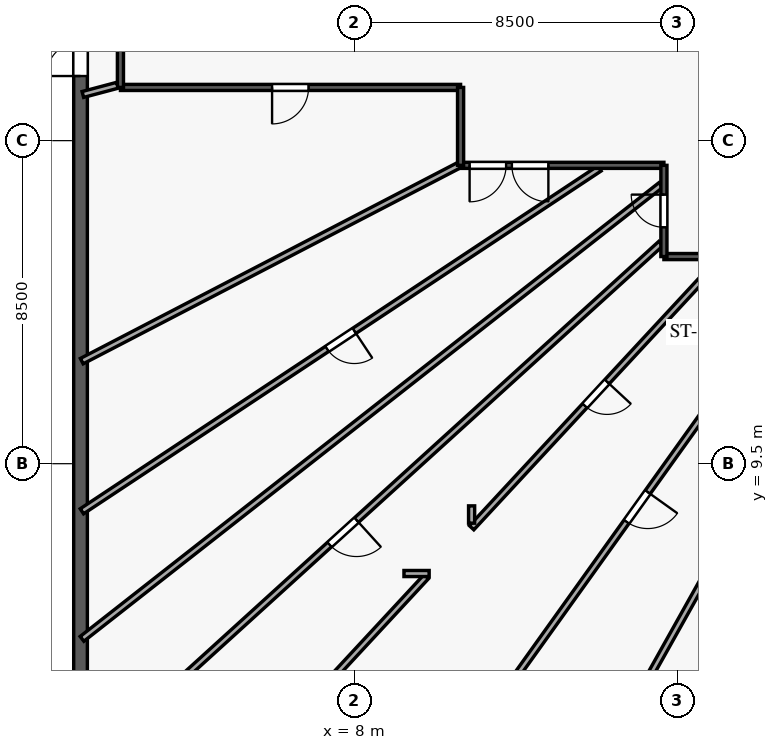
"""IFC4 building model, lengths in metres.
Left out: names, types, materials, properties, quantities, classifications, styles, units other than length and angle.
Written with IfcOpenShell. Run it as: python <this file> out.ifc"""

import sys

from ifc_helpers import new_model, si_unit, direction, frame, frame_2d, origin, origin_with_axes, origin_2d, place, context, subcontext, project, spatial, rectangle, circle, extrude, source, transform, mapped, element, fill, save


model = new_model("IFC4")
c1 = context("Model", 3, precision=1e-05, world=origin(), true_north=direction((0.0, 1.0)))
c2 = subcontext(c1, "Body", "Model", "MODEL_VIEW")
j1 = project(units=[si_unit("LENGTHUNIT", "METRE"), si_unit("PLANEANGLEUNIT", "RADIAN")], contexts=[c1])
p1 = place(None, origin())
s1 = spatial("IfcSite", under=j1, at=p1, CompositionType="ELEMENT")
p2 = place(p1, origin())
s2 = spatial("IfcBuilding", under=s1, at=p2, CompositionType="ELEMENT")
p3 = place(p2, origin())
s3 = spatial("IfcBuildingStorey", under=s2, at=p3, CompositionType="ELEMENT", Elevation=0.0)
m1 = source(origin_with_axes(), c2, "Body", "SweptSolid", [
    extrude(circle(Radius=0.9, at=origin_2d()), origin(), (0.0, 0.0, 1.0), 4.5),
])
p4 = place(p3, frame((10.2, 7.5, 0.0), z_axis=(0.0, 0.0, 1.0), x_axis=(1.0, 0.0, 0.0)))
e1 = element("IfcColumn", 1, at=p4, inside=s3, PredefinedType="COLUMN", context=c2, shape_type="MappedRepresentation", body=[
    mapped(m1, transform((0.0, 0.0, 0.0), scale=1.0)),
])
p5 = place(p3, frame((0.8, 2.5, 0.0), z_axis=(0.0, 0.0, 1.0), x_axis=(0.0, 1.0, 0.0)))
e2 = element("IfcWall", 2, at=p5, inside=s3, PredefinedType="SOLIDWALL", context=c2, shape_type="SweptSolid", body=[
    extrude(rectangle(XDim=48.0, YDim=0.36, at=frame_2d((24.0, 0.0))), origin(), (0.0, 0.0, 1.0), 4.2),
])
p6 = place(p5, frame((42.816, 0.0, 0.85)))
e3 = element("IfcOpeningElement", 3, at=p6, cuts=e2, PredefinedType="OPENING", context=c2, shape_type="SweptSolid", body=[
    extrude(rectangle(XDim=1.8, YDim=2.2, at=frame_2d((0.9, 1.1))), frame((0.0, 0.19, 0.0), z_axis=(0.0, -1.0, 0.0), x_axis=(1.0, 0.0, 0.0)), (0.0, 0.0, 1.0), 0.38),
])
p7 = place(p5, frame((38.338, 0.0, 0.85)))
e4 = element("IfcOpeningElement", 4, at=p7, cuts=e2, PredefinedType="OPENING", context=c2, shape_type="SweptSolid", body=[
    extrude(rectangle(XDim=1.8, YDim=2.2, at=frame_2d((0.9, 1.1))), frame((0.0, 0.19, 0.0), z_axis=(0.0, -1.0, 0.0), x_axis=(1.0, 0.0, 0.0)), (0.0, 0.0, 1.0), 0.38),
])
p8 = place(p5, frame((33.194, 0.0, 0.85)))
e5 = element("IfcOpeningElement", 5, at=p8, cuts=e2, PredefinedType="OPENING", context=c2, shape_type="SweptSolid", body=[
    extrude(rectangle(XDim=1.8, YDim=2.2, at=frame_2d((0.9, 1.1))), frame((0.0, 0.19, 0.0), z_axis=(0.0, -1.0, 0.0), x_axis=(1.0, 0.0, 0.0)), (0.0, 0.0, 1.0), 0.38),
])
p9 = place(p5, frame((29.492, 0.0, 0.85)))
e6 = element("IfcOpeningElement", 6, at=p9, cuts=e2, PredefinedType="OPENING", context=c2, shape_type="SweptSolid", body=[
    extrude(rectangle(XDim=1.8, YDim=2.2, at=frame_2d((0.9, 1.1))), frame((0.0, 0.19, 0.0), z_axis=(0.0, -1.0, 0.0), x_axis=(1.0, 0.0, 0.0)), (0.0, 0.0, 1.0), 0.38),
])
p10 = place(p5, frame((24.971, 0.0, 0.85)))
e7 = element("IfcOpeningElement", 7, at=p10, cuts=e2, PredefinedType="OPENING", context=c2, shape_type="SweptSolid", body=[
    extrude(rectangle(XDim=1.8, YDim=2.2, at=frame_2d((0.9, 1.1))), frame((0.0, 0.19, 0.0), z_axis=(0.0, -1.0, 0.0), x_axis=(1.0, 0.0, 0.0)), (0.0, 0.0, 1.0), 0.38),
])
p11 = place(p5, frame((12.315, 0.0, 0.85)))
e8 = element("IfcOpeningElement", 8, at=p11, cuts=e2, PredefinedType="OPENING", context=c2, shape_type="SweptSolid", body=[
    extrude(rectangle(XDim=1.8, YDim=2.2, at=frame_2d((0.9, 1.1))), frame((0.0, 0.19, 0.0), z_axis=(0.0, -1.0, 0.0), x_axis=(1.0, 0.0, 0.0)), (0.0, 0.0, 1.0), 0.38),
])
p12 = place(p5, frame((6.841, 0.0, 0.85)))
e9 = element("IfcOpeningElement", 9, at=p12, cuts=e2, PredefinedType="OPENING", context=c2, shape_type="SweptSolid", body=[
    extrude(rectangle(XDim=1.8, YDim=2.2, at=frame_2d((0.9, 1.1))), frame((0.0, 0.19, 0.0), z_axis=(0.0, -1.0, 0.0), x_axis=(1.0, 0.0, 0.0)), (0.0, 0.0, 1.0), 0.38),
])
p13 = place(p5, frame((3.189, 0.0, 0.85)))
e10 = element("IfcOpeningElement", 10, at=p13, cuts=e2, PredefinedType="OPENING", context=c2, shape_type="SweptSolid", body=[
    extrude(rectangle(XDim=1.8, YDim=2.2, at=frame_2d((0.9, 1.1))), frame((0.0, 0.19, 0.0), z_axis=(0.0, -1.0, 0.0), x_axis=(1.0, 0.0, 0.0)), (0.0, 0.0, 1.0), 0.38),
])
p14 = place(p5, frame((17.2, 0.0, 0.0)))
e11 = element("IfcOpeningElement", 11, at=p14, cuts=e2, PredefinedType="OPENING", context=c2, shape_type="SweptSolid", body=[
    extrude(rectangle(XDim=1.8, YDim=2.3, at=frame_2d((0.9, 1.15))), frame((0.0, 0.19, 0.0), z_axis=(0.0, -1.0, 0.0), x_axis=(1.0, 0.0, 0.0)), (0.0, 0.0, 1.0), 0.38),
])
p15 = place(p3, frame((16.068, 15.289, 0.0), z_axis=(0.0, 0.0, 1.0), x_axis=(-0.740229029454, -0.672354805109, 0.0)))
e12 = element("IfcWall", 12, at=p15, inside=s3, PredefinedType="PARTITIONING", context=c2, shape_type="SweptSolid", body=[
    extrude(rectangle(XDim=19.837, YDim=0.16, at=frame_2d((9.918, 0.0))), origin(), (0.0, 0.0, 1.0), 3.25),
])
p16 = place(p15, frame((10.816, 0.0, 0.0)))
e13 = element("IfcOpeningElement", 13, at=p16, cuts=e12, PredefinedType="OPENING", context=c2, shape_type="SweptSolid", body=[
    extrude(rectangle(XDim=0.96, YDim=2.15, at=frame_2d((0.48, 1.075))), frame((0.0, 0.09, 0.0), z_axis=(0.0, -1.0, 0.0), x_axis=(1.0, 0.0, 0.0)), (0.0, 0.0, 1.0), 0.18),
])
p17 = place(p3, frame((16.068, 16.83, 0.0), z_axis=(0.0, 0.0, 1.0), x_axis=(-0.786986378296, -0.616970372366, 0.0)))
e14 = element("IfcWall", 14, at=p17, inside=s3, PredefinedType="PARTITIONING", context=c2, shape_type="SweptSolid", body=[
    extrude(rectangle(XDim=19.351, YDim=0.16, at=frame_2d((9.676, 0.0))), origin(), (0.0, 0.0, 1.0), 4.2),
])
p18 = place(p3, frame((14.454, 17.268, 0.0), z_axis=(0.0, 0.0, 1.0), x_axis=(-0.83369067589, -0.55223170584, 0.0)))
e15 = element("IfcWall", 15, at=p18, inside=s3, PredefinedType="PARTITIONING", context=c2, shape_type="SweptSolid", body=[
    extrude(rectangle(XDim=16.335, YDim=0.16, at=frame_2d((8.167, 0.0))), origin(), (0.0, 0.0, 1.0), 4.2),
])
p19 = place(p18, frame((7.737, 0.0, 0.0)))
e16 = element("IfcOpeningElement", 16, at=p19, cuts=e15, PredefinedType="OPENING", context=c2, shape_type="SweptSolid", body=[
    extrude(rectangle(XDim=0.86, YDim=2.04, at=frame_2d((0.43, 1.02))), frame((0.0, 0.09, 0.0), z_axis=(0.0, -1.0, 0.0), x_axis=(1.0, 0.0, 0.0)), (0.0, 0.0, 1.0), 0.18),
])
p20 = place(p3, frame((20.101, 14.868, 0.0), z_axis=(0.0, 0.0, 1.0), x_axis=(-0.581991703878, -0.813194722448, 0.0)))
e17 = element("IfcWall", 17, at=p20, inside=s3, PredefinedType="PARTITIONING", context=c2, shape_type="SweptSolid", body=[
    extrude(rectangle(XDim=16.024, YDim=0.16, at=frame_2d((8.012, 0.0))), origin(), (0.0, 0.0, 1.0), 4.2),
])
p21 = place(p20, frame((7.52, 0.0, 0.0)))
e18 = element("IfcOpeningElement", 18, at=p21, cuts=e17, PredefinedType="OPENING", context=c2, shape_type="SweptSolid", body=[
    extrude(rectangle(XDim=0.96, YDim=2.15, at=frame_2d((0.48, 1.075))), frame((0.0, 0.09, 0.0), z_axis=(0.0, -1.0, 0.0), x_axis=(1.0, 0.0, 0.0)), (0.0, 0.0, 1.0), 0.18),
])
p22 = place(p3, frame((21.118, 13.45, 0.0), z_axis=(0.0, 0.0, 1.0), x_axis=(-0.488869643444, -0.872356848841, 0.0)))
e19 = element("IfcWall", 19, at=p22, inside=s3, PredefinedType="PARTITIONING", context=c2, shape_type="SweptSolid", body=[
    extrude(rectangle(XDim=13.316, YDim=0.16, at=frame_2d((6.658, 0.0))), origin(), (0.0, 0.0, 1.0), 4.2),
])
p23 = place(p3, frame((10.827, 17.389, 0.0), z_axis=(0.0, 0.0, 1.0), x_axis=(-0.8874495265, -0.460904912009, 0.0)))
e20 = element("IfcWall", 20, at=p23, inside=s3, PredefinedType="PARTITIONING", context=c2, shape_type="SweptSolid", body=[
    extrude(rectangle(XDim=11.262, YDim=0.16, at=frame_2d((5.631, 0.0))), origin(), (0.0, 0.0, 1.0), 4.2),
])
p24 = place(p3, frame((17.631, 14.868, 0.0), z_axis=(0.0, 0.0, 1.0), x_axis=(-0.679969088338, -0.733240778261, 0.0)))
e21 = element("IfcWall", 21, at=p24, inside=s3, PredefinedType="PARTITIONING", context=c2, shape_type="SweptSolid", body=[
    extrude(rectangle(XDim=9.62, YDim=0.16, at=frame_2d((4.81, 0.0))), origin(), (0.0, 0.0, 1.0), 3.25),
])
p25 = place(p24, frame((4.38, 0.0, 0.0)))
e22 = element("IfcOpeningElement", 22, at=p25, cuts=e21, PredefinedType="OPENING", context=c2, shape_type="SweptSolid", body=[
    extrude(rectangle(XDim=0.86, YDim=2.04, at=frame_2d((0.43, 1.02))), frame((0.0, 0.09, 0.0), z_axis=(0.0, -1.0, 0.0), x_axis=(1.0, 0.0, 0.0)), (0.0, 0.0, 1.0), 0.18),
])
p26 = place(p3, frame((10.8, 19.4, 0.0), z_axis=(0.0, 0.0, 1.0), x_axis=(-1.0, 0.0, 0.0)))
e23 = element("IfcWall", 23, at=p26, inside=s3, PredefinedType="PARTITIONING", context=c2, shape_type="SweptSolid", body=[
    extrude(rectangle(XDim=8.95, YDim=0.16, at=frame_2d((4.475, 0.0))), origin(), (0.0, 0.0, 1.0), 4.2),
])
p27 = place(p26, frame((4.0, 0.0, 0.0)))
e24 = element("IfcOpeningElement", 24, at=p27, cuts=e23, PredefinedType="OPENING", context=c2, shape_type="SweptSolid", body=[
    extrude(rectangle(XDim=0.96, YDim=2.15, at=frame_2d((0.48, 1.075))), frame((0.0, 0.09, 0.0), z_axis=(0.0, -1.0, 0.0), x_axis=(1.0, 0.0, 0.0)), (0.0, 0.0, 1.0), 0.18),
])
p28 = place(p3, frame((9.897, 6.528, 0.0), z_axis=(0.0, 0.0, 1.0), x_axis=(-0.679977657187, -0.733232831866, 0.0)))
e25 = element("IfcWall", 25, at=p28, inside=s3, PredefinedType="PARTITIONING", context=c2, shape_type="SweptSolid", body=[
    extrude(rectangle(XDim=6.391, YDim=0.16, at=frame_2d((3.195, 0.0))), origin(), (0.0, 0.0, 1.0), 4.2),
])
p29 = place(p3, frame((16.15, 17.35, 0.0), z_axis=(0.0, 0.0, 1.0), x_axis=(-1.0, 0.0, 0.0)))
e26 = element("IfcWall", 26, at=p29, inside=s3, PredefinedType="PARTITIONING", context=c2, shape_type="SweptSolid", body=[
    extrude(rectangle(XDim=5.35, YDim=0.16, at=frame_2d((2.675, 0.0))), origin(), (0.0, 0.0, 1.0), 4.2),
])
p30 = place(p29, frame((3.04, 0.0, 0.0)))
e27 = element("IfcOpeningElement", 27, at=p30, cuts=e26, PredefinedType="OPENING", context=c2, shape_type="SweptSolid", body=[
    extrude(rectangle(XDim=0.96, YDim=2.15, at=frame_2d((0.48, 1.075))), frame((0.0, 0.09, 0.0), z_axis=(0.0, -1.0, 0.0), x_axis=(1.0, 0.0, 0.0)), (0.0, 0.0, 1.0), 0.18),
])
p31 = place(p29, frame((4.153, 0.0, 0.0)))
e28 = element("IfcOpeningElement", 28, at=p31, cuts=e26, PredefinedType="OPENING", context=c2, shape_type="SweptSolid", body=[
    extrude(rectangle(XDim=0.96, YDim=2.15, at=frame_2d((0.48, 1.075))), frame((0.0, 0.09, 0.0), z_axis=(0.0, -1.0, 0.0), x_axis=(1.0, 0.0, 0.0)), (0.0, 0.0, 1.0), 0.18),
])
p32 = place(p3, frame((21.2, 14.95, 0.0), z_axis=(0.0, 0.0, 1.0), x_axis=(-1.0, 0.0, 0.0)))
e29 = element("IfcWall", 29, at=p32, inside=s3, PredefinedType="PARTITIONING", context=c2, shape_type="SweptSolid", body=[
    extrude(rectangle(XDim=5.05, YDim=0.16, at=frame_2d((2.525, 0.0))), origin(), (0.0, 0.0, 1.0), 4.2),
])
p33 = place(p32, frame((2.05, 0.0, 0.0)))
e30 = element("IfcOpeningElement", 30, at=p33, cuts=e29, PredefinedType="OPENING", context=c2, shape_type="SweptSolid", body=[
    extrude(rectangle(XDim=0.96, YDim=2.15, at=frame_2d((0.48, 1.075))), frame((0.0, 0.09, 0.0), z_axis=(0.0, -1.0, 0.0), x_axis=(1.0, 0.0, 0.0)), (0.0, 0.0, 1.0), 0.18),
])
p34 = place(p3, frame((1.85, 19.4, 0.0), z_axis=(0.0, 0.0, 1.0), x_axis=(0.0, 1.0, 0.0)))
e31 = element("IfcWall", 31, at=p34, inside=s3, PredefinedType="PARTITIONING", context=c2, shape_type="SweptSolid", body=[
    extrude(rectangle(XDim=2.45, YDim=0.16, at=frame_2d((1.225, 0.0))), origin(), (0.0, 0.0, 1.0), 4.2),
])
p35 = place(p3, frame((16.15, 14.95, 0.0), z_axis=(0.0, 0.0, 1.0), x_axis=(0.0, 1.0, 0.0)))
e32 = element("IfcWall", 32, at=p35, inside=s3, PredefinedType="PARTITIONING", context=c2, shape_type="SweptSolid", body=[
    extrude(rectangle(XDim=2.4, YDim=0.16, at=frame_2d((1.2, 0.0))), origin(), (0.0, 0.0, 1.0), 3.25),
])
p36 = place(p35, frame((0.77, 0.0, 0.0)))
e33 = element("IfcOpeningElement", 33, at=p36, cuts=e32, PredefinedType="OPENING", context=c2, shape_type="SweptSolid", body=[
    extrude(rectangle(XDim=0.86, YDim=2.04, at=frame_2d((0.43, 1.02))), frame((0.0, 0.09, 0.0), z_axis=(0.0, -1.0, 0.0), x_axis=(1.0, 0.0, 0.0)), (0.0, 0.0, 1.0), 0.18),
])
p37 = place(p3, frame((10.8, 17.35, 0.0), z_axis=(0.0, 0.0, 1.0), x_axis=(0.0, 1.0, 0.0)))
e34 = element("IfcWall", 34, at=p37, inside=s3, PredefinedType="PARTITIONING", context=c2, shape_type="SweptSolid", body=[
    extrude(rectangle(XDim=2.05, YDim=0.16, at=frame_2d((1.025, 0.0))), origin(), (0.0, 0.0, 1.0), 3.25),
])
p38 = place(p3, frame((1.768, 19.456, 0.0), z_axis=(0.0, 0.0, 1.0), x_axis=(-0.966407427341, -0.257014949721, 0.0)))
e35 = element("IfcWall", 35, at=p38, inside=s3, PredefinedType="PARTITIONING", context=c2, shape_type="SweptSolid", body=[
    extrude(rectangle(XDim=0.938, YDim=0.16, at=frame_2d((0.469, 0.0))), origin(), (0.0, 0.0, 1.0), 4.2),
])
p39 = place(p3, frame((9.31, 6.61, 0.0), z_axis=(0.0, 0.0, 1.0), x_axis=(1.0, 0.0, 0.0)))
e36 = element("IfcWall", 36, at=p39, inside=s3, PredefinedType="PARTITIONING", context=c2, shape_type="SweptSolid", body=[
    extrude(rectangle(XDim=0.663, YDim=0.16, at=frame_2d((0.332, 0.0))), origin(), (0.0, 0.0, 1.0), 4.2),
])
p40 = place(p3, frame((11.09, 7.935, 0.0), z_axis=(0.0, 0.0, 1.0), x_axis=(0.0, 1.0, 0.0)))
e37 = element("IfcWall", 37, at=p40, inside=s3, PredefinedType="PARTITIONING", context=c2, shape_type="SweptSolid", body=[
    extrude(rectangle(XDim=0.455, YDim=0.16, at=frame_2d((0.228, 0.0))), origin(), (0.0, 0.0, 1.0), 3.25),
])
m2 = source(origin_with_axes(), c2, "Body", "SweptSolid", [
    extrude(rectangle(XDim=1.8, YDim=2.2, at=frame_2d((0.9, 1.1))), frame((0.0, 0.03, 0.0), z_axis=(0.0, -1.0, 0.0), x_axis=(1.0, 0.0, 0.0)), (0.0, 0.0, 1.0), 0.06),
])
p41 = place(p11, origin())
e38 = element("IfcWindow", 38, at=p41, inside=s3, PartitioningType="SINGLE_PANEL", PredefinedType="WINDOW", context=c2, shape_type="MappedRepresentation", body=[
    mapped(m2, transform((0.0, 0.0, 0.0), scale=1.0)),
])
fill(e8, e38)
p42 = place(p12, origin())
e39 = element("IfcWindow", 39, at=p42, inside=s3, PartitioningType="SINGLE_PANEL", PredefinedType="WINDOW", context=c2, shape_type="MappedRepresentation", body=[
    mapped(m2, transform((0.0, 0.0, 0.0), scale=1.0)),
])
fill(e9, e39)
p43 = place(p13, origin())
e40 = element("IfcWindow", 40, at=p43, inside=s3, PartitioningType="SINGLE_PANEL", PredefinedType="WINDOW", context=c2, shape_type="MappedRepresentation", body=[
    mapped(m2, transform((0.0, 0.0, 0.0), scale=1.0)),
])
fill(e10, e40)
m3 = source(origin_with_axes(), c2, "Body", "SweptSolid", [
    extrude(rectangle(XDim=1.8, YDim=2.3, at=frame_2d((0.9, 1.15))), frame((0.0, 0.025, 0.0), z_axis=(0.0, -1.0, 0.0), x_axis=(1.0, 0.0, 0.0)), (0.0, 0.0, 1.0), 0.05),
])
p44 = place(p14, origin())
e41 = element("IfcDoor", 41, at=p44, inside=s3, OperationType="DOUBLE_DOOR_SINGLE_SWING", PredefinedType="DOOR", context=c2, shape_type="MappedRepresentation", body=[
    mapped(m3, transform((0.0, 0.0, 0.0), scale=1.0)),
])
fill(e11, e41)
m4 = source(origin_with_axes(), c2, "Body", "SweptSolid", [
    extrude(rectangle(XDim=0.96, YDim=2.15, at=frame_2d((0.48, 1.075))), frame((0.0, 0.025, 0.0), z_axis=(0.0, -1.0, 0.0), x_axis=(1.0, 0.0, 0.0)), (0.0, 0.0, 1.0), 0.05),
])
p45 = place(p27, origin())
e42 = element("IfcDoor", 42, at=p45, inside=s3, OperationType="SINGLE_SWING_RIGHT", PredefinedType="DOOR", context=c2, shape_type="MappedRepresentation", body=[
    mapped(m4, transform((0.0, 0.0, 0.0), scale=1.0)),
])
fill(e24, e42)
p46 = place(p30, origin())
e43 = element("IfcDoor", 43, at=p46, inside=s3, OperationType="SINGLE_SWING_LEFT", PredefinedType="DOOR", context=c2, shape_type="MappedRepresentation", body=[
    mapped(m4, transform((0.0, 0.0, 0.0), scale=1.0)),
])
fill(e27, e43)
p47 = place(p31, origin())
e44 = element("IfcDoor", 44, at=p47, inside=s3, OperationType="SINGLE_SWING_RIGHT", PredefinedType="DOOR", context=c2, shape_type="MappedRepresentation", body=[
    mapped(m4, transform((0.0, 0.0, 0.0), scale=1.0)),
])
fill(e28, e44)
p48 = place(p16, origin())
e45 = element("IfcDoor", 45, at=p48, inside=s3, OperationType="SINGLE_SWING_LEFT", PredefinedType="DOOR", context=c2, shape_type="MappedRepresentation", body=[
    mapped(m4, transform((0.0, 0.0, 0.0), scale=1.0)),
])
fill(e13, e45)
p49 = place(p21, origin())
e46 = element("IfcDoor", 46, at=p49, inside=s3, OperationType="SINGLE_SWING_LEFT", PredefinedType="DOOR", context=c2, shape_type="MappedRepresentation", body=[
    mapped(m4, transform((0.0, 0.0, 0.0), scale=1.0)),
])
fill(e18, e46)
m5 = source(origin_with_axes(), c2, "Body", "SweptSolid", [
    extrude(rectangle(XDim=0.86, YDim=2.04, at=frame_2d((0.43, 1.02))), frame((0.0, 0.025, 0.0), z_axis=(0.0, -1.0, 0.0), x_axis=(1.0, 0.0, 0.0)), (0.0, 0.0, 1.0), 0.05),
])
p50 = place(p19, origin())
e47 = element("IfcDoor", 47, at=p50, inside=s3, OperationType="SINGLE_SWING_LEFT", PredefinedType="DOOR", context=c2, shape_type="MappedRepresentation", body=[
    mapped(m5, transform((0.0, 0.0, 0.0), scale=1.0)),
])
fill(e16, e47)
p51 = place(p36, origin())
e48 = element("IfcDoor", 48, at=p51, inside=s3, OperationType="SINGLE_SWING_RIGHT", PredefinedType="DOOR", context=c2, shape_type="MappedRepresentation", body=[
    mapped(m5, transform((0.0, 0.0, 0.0), scale=1.0)),
])
fill(e33, e48)
p52 = place(p25, origin())
e49 = element("IfcDoor", 49, at=p52, inside=s3, OperationType="SINGLE_SWING_LEFT", PredefinedType="DOOR", context=c2, shape_type="MappedRepresentation", body=[
    mapped(m5, transform((0.0, 0.0, 0.0), scale=1.0)),
])
fill(e22, e49)
save(model, sys.argv[1])
